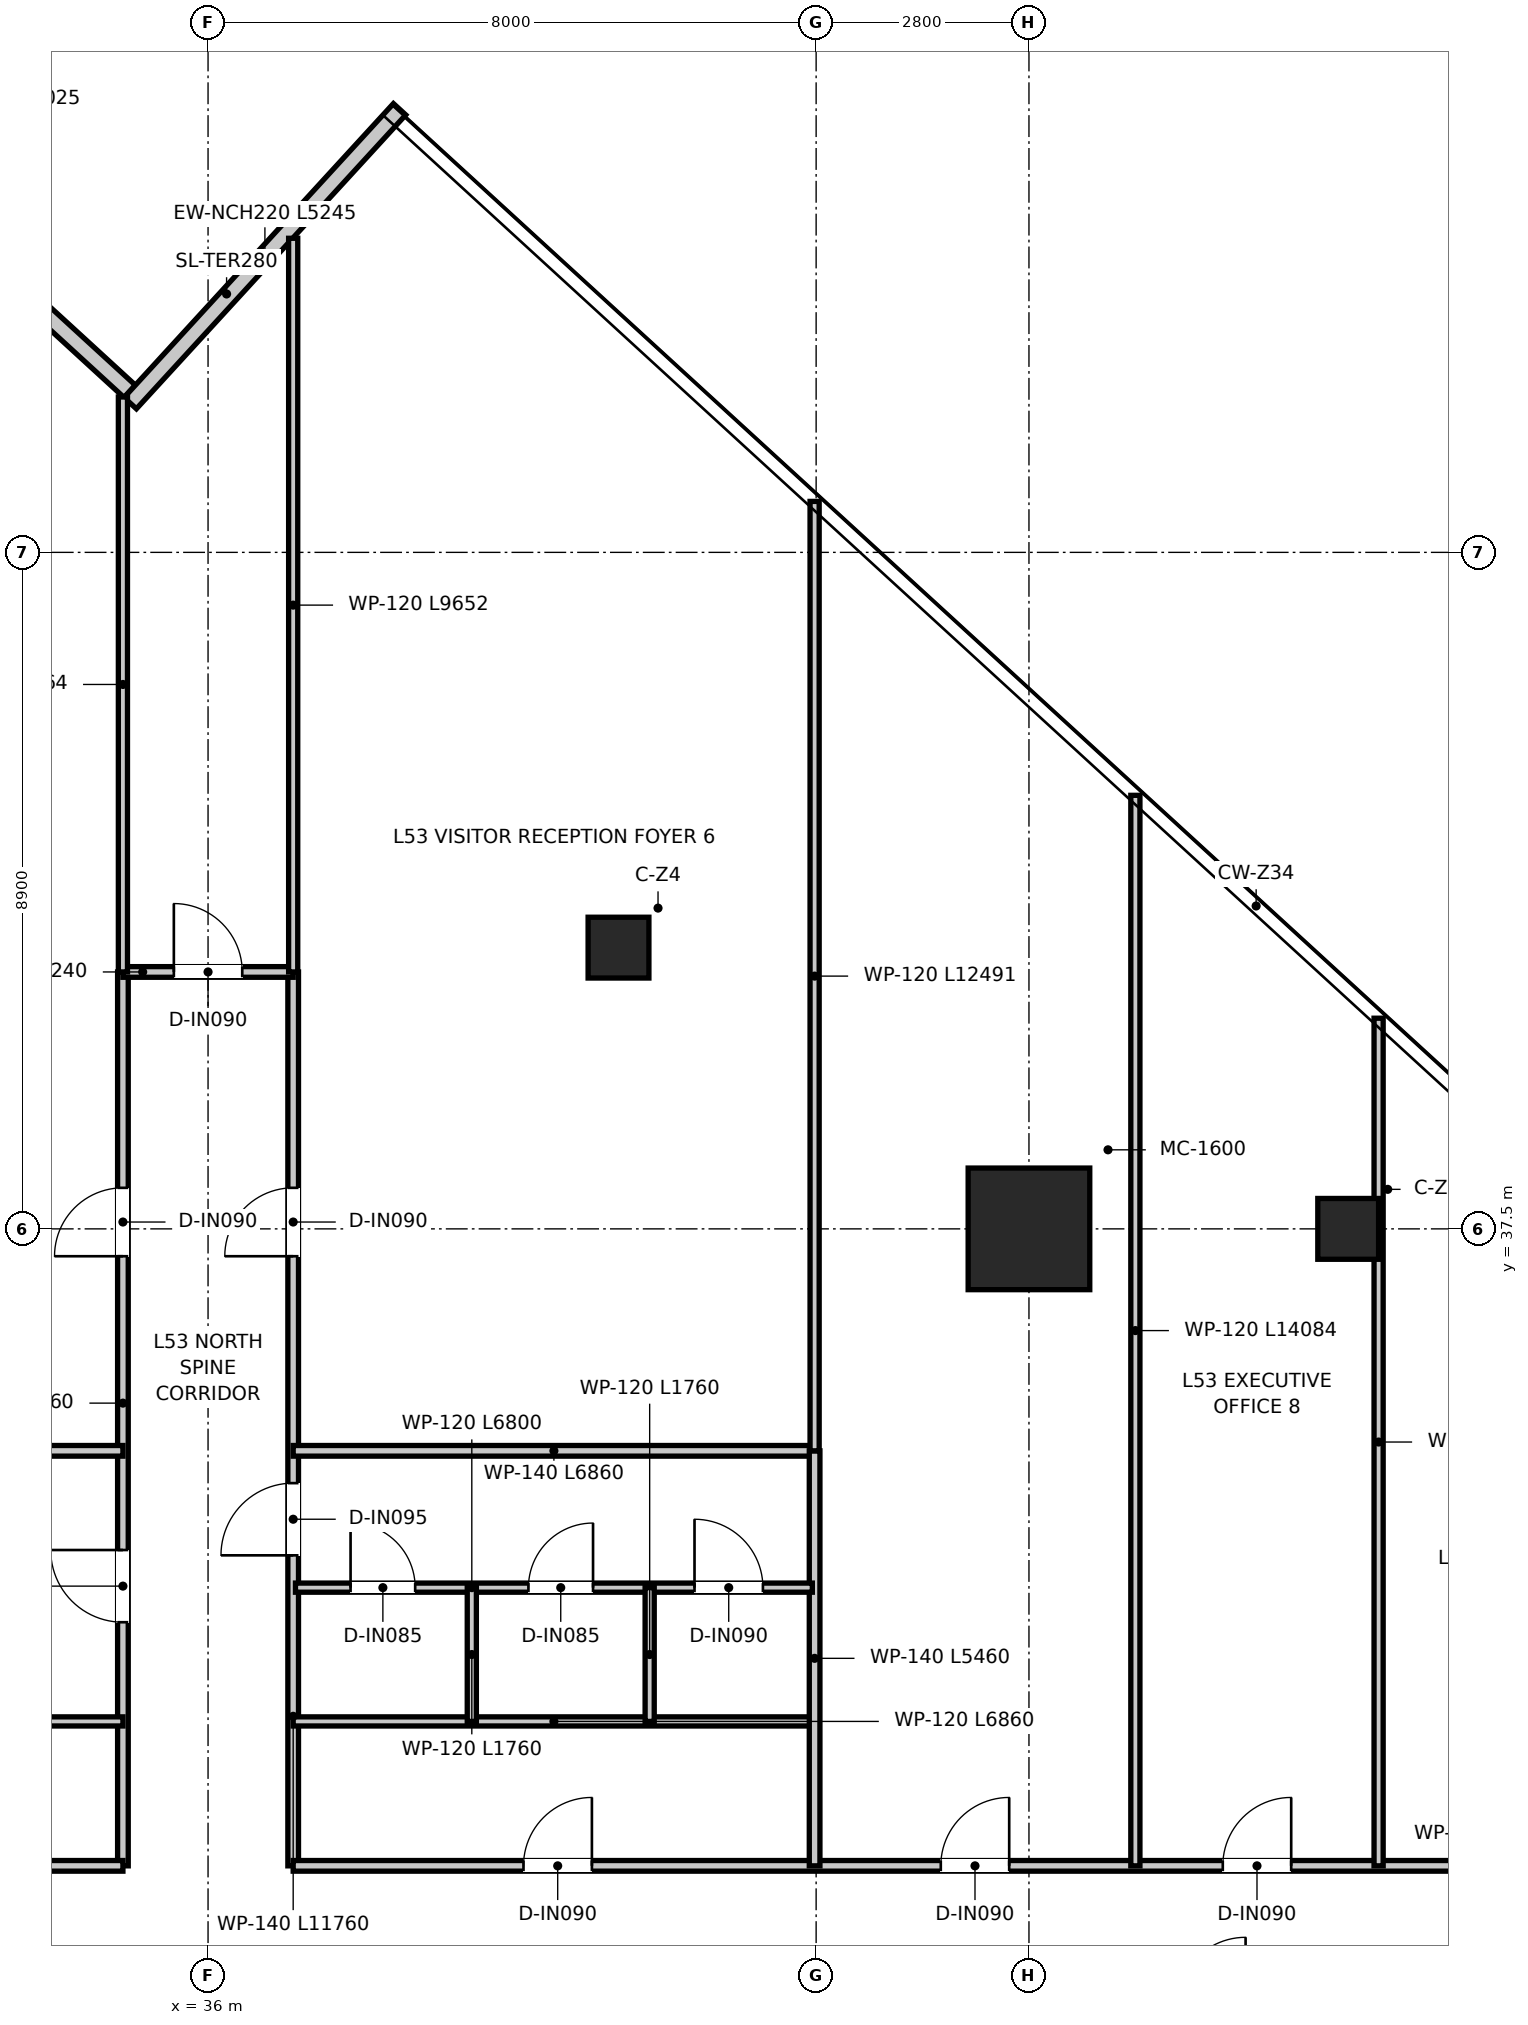
"""IFC4 building model, lengths in metres.
Left out: names, types, materials, properties, quantities, classifications, styles, units other than length and angle.
Written with IfcOpenShell. Run it as: python <this file> out.ifc"""

import sys

from ifc_helpers import new_model, si_unit, direction, frame, frame_2d, origin, origin_2d, place, context, subcontext, project, spatial, rectangle, extrude, source, transform, mapped, element, fill, save


model = new_model("IFC4")
c1 = context("Model", 3, precision=1e-05, world=origin(), true_north=direction((0.0, 1.0)))
c2 = subcontext(c1, "Body", "Model", "MODEL_VIEW")
j1 = project(units=[si_unit("LENGTHUNIT", "METRE"), si_unit("PLANEANGLEUNIT", "RADIAN")], contexts=[c1])
p1 = place(None, origin())
s1 = spatial("IfcSite", under=j1, at=p1, CompositionType="ELEMENT")
p2 = place(p1, origin())
s2 = spatial("IfcBuilding", under=s1, at=p2, CompositionType="ELEMENT")
p3 = place(p2, frame((0.0, 0.0, 219.15)))
s3 = spatial("IfcBuildingStorey", under=s2, at=p3, CompositionType="ELEMENT", Elevation=219.15)
m1 = source(origin(), c2, "Body", "SweptSolid", [
    extrude(rectangle(XDim=1.6, YDim=1.6, at=origin_2d()), origin(), (0.0, 0.0, 1.0), 3.95),
])
p4 = place(p3, frame((46.8, 37.5, 0.0), z_axis=(0.0, 0.0, 1.0), x_axis=(1.0, 0.0, 0.0)))
e1 = element("IfcColumn", 1, at=p4, inside=s3, PredefinedType="USERDEFINED", context=c2, shape_type="MappedRepresentation", body=[
    mapped(m1, transform((0.0, 0.0, 0.0), x_axis=(1.0, 0.0, 0.0), y_axis=(0.0, 1.0, 0.0), z_axis=(0.0, 0.0, 1.0), scale=1.0)),
])
m2 = source(origin(), c2, "Body", "SweptSolid", [
    extrude(rectangle(XDim=0.8, YDim=0.8, at=origin_2d()), origin(), (0.0, 0.0, 1.0), 3.95),
])
for number, where, z_axis, x_axis in (
    (2, (41.4, 41.2, 0.0), (0.0, 0.0, 1.0), (1.0, 0.0, 0.0)),
    (3, (51.0, 37.5, 0.0), (0.0, 0.0, 1.0), (1.0, 0.0, 0.0)),
):
    element("IfcColumn", number, at=place(p3, frame(where, z_axis=z_axis, x_axis=x_axis)), inside=s3, PredefinedType="COLUMN", context=c2, shape_type="MappedRepresentation", body=[
        mapped(m2, transform((0.0, 0.0, 0.0), x_axis=(1.0, 0.0, 0.0), y_axis=(0.0, 1.0, 0.0), z_axis=(0.0, 0.0, 1.0), scale=1.0)),
    ])
p5 = place(p3, frame((34.969, 48.518, 0.0), z_axis=(0.0, 0.0, 1.0), x_axis=(-0.737285215553, 0.675581609375, 0.0)))
e4 = element("IfcWall", 4, at=p5, inside=s3, PredefinedType="ELEMENTEDWALL", context=c2, shape_type="SweptSolid", body=[
    extrude(rectangle(XDim=5.025, YDim=0.22, at=frame_2d((2.512, 0.0))), origin(), (0.0, 0.0, 1.0), 3.67),
])
p6 = place(p3, frame((38.52, 52.23, 0.0), z_axis=(0.0, 0.0, 1.0), x_axis=(-0.675596040677, -0.737271991752, 0.0)))
e5 = element("IfcWall", 5, at=p6, inside=s3, PredefinedType="ELEMENTEDWALL", context=c2, shape_type="SweptSolid", body=[
    extrude(rectangle(XDim=5.245, YDim=0.22, at=frame_2d((2.623, 0.0))), origin(), (0.0, 0.0, 1.0), 3.67),
])
p7 = place(p3, frame((34.88, 29.12, 0.0), z_axis=(0.0, 0.0, 1.0), x_axis=(0.0, 1.0, 0.0)))
e6 = element("IfcWall", 6, at=p7, inside=s3, PredefinedType="PARTITIONING", context=c2, shape_type="SweptSolid", body=[
    extrude(rectangle(XDim=11.76, YDim=0.14, at=frame_2d((5.88, 0.0))), origin(), (0.0, 0.0, 1.0), 3.03),
])
p8 = place(p7, frame((3.205, 0.0, 0.0)))
e7 = element("IfcOpeningElement", 7, at=p8, cuts=e6, PredefinedType="OPENING", context=c2, shape_type="SweptSolid", body=[
    extrude(rectangle(XDim=0.95, YDim=2.1, at=frame_2d((0.475, 1.05))), frame((0.0, 0.08, 0.0), z_axis=(0.0, -1.0, 0.0), x_axis=(1.0, 0.0, 0.0)), (0.0, 0.0, 1.0), 0.16),
])
p9 = place(p7, frame((8.02, 0.0, 0.0)))
e8 = element("IfcOpeningElement", 8, at=p9, cuts=e6, PredefinedType="OPENING", context=c2, shape_type="SweptSolid", body=[
    extrude(rectangle(XDim=0.9, YDim=2.1, at=frame_2d((0.45, 1.05))), frame((0.0, 0.08, 0.0), z_axis=(0.0, -1.0, 0.0), x_axis=(1.0, 0.0, 0.0)), (0.0, 0.0, 1.0), 0.16),
])
p10 = place(p3, frame((37.12, 29.12, 0.0), z_axis=(0.0, 0.0, 1.0), x_axis=(0.0, 1.0, 0.0)))
e9 = element("IfcWall", 9, at=p10, inside=s3, PredefinedType="PARTITIONING", context=c2, shape_type="SweptSolid", body=[
    extrude(rectangle(XDim=11.76, YDim=0.14, at=frame_2d((5.88, 0.0))), origin(), (0.0, 0.0, 1.0), 3.03),
])
p11 = place(p10, frame((4.085, 0.0, 0.0)))
e10 = element("IfcOpeningElement", 10, at=p11, cuts=e9, PredefinedType="OPENING", context=c2, shape_type="SweptSolid", body=[
    extrude(rectangle(XDim=0.95, YDim=2.1, at=frame_2d((0.475, 1.05))), frame((0.0, 0.08, 0.0), z_axis=(0.0, -1.0, 0.0), x_axis=(1.0, 0.0, 0.0)), (0.0, 0.0, 1.0), 0.16),
])
p12 = place(p10, frame((8.02, 0.0, 0.0)))
e11 = element("IfcOpeningElement", 11, at=p12, cuts=e9, PredefinedType="OPENING", context=c2, shape_type="SweptSolid", body=[
    extrude(rectangle(XDim=0.9, YDim=2.1, at=frame_2d((0.45, 1.05))), frame((0.0, 0.08, 0.0), z_axis=(0.0, -1.0, 0.0), x_axis=(1.0, 0.0, 0.0)), (0.0, 0.0, 1.0), 0.16),
])
p13 = place(p3, frame((34.88, 40.88, 0.0), z_axis=(0.0, 0.0, 1.0), x_axis=(1.0, 0.0, 0.0)))
e12 = element("IfcWall", 12, at=p13, inside=s3, PredefinedType="PARTITIONING", context=c2, shape_type="SweptSolid", body=[
    extrude(rectangle(XDim=2.24, YDim=0.14, at=frame_2d((1.12, 0.0))), origin(), (0.0, 0.0, 1.0), 3.67),
])
p14 = place(p13, frame((0.67, 0.0, 0.0)))
e13 = element("IfcOpeningElement", 13, at=p14, cuts=e12, PredefinedType="OPENING", context=c2, shape_type="SweptSolid", body=[
    extrude(rectangle(XDim=0.9, YDim=2.1, at=frame_2d((0.45, 1.05))), frame((0.0, 0.08, 0.0), z_axis=(0.0, -1.0, 0.0), x_axis=(1.0, 0.0, 0.0)), (0.0, 0.0, 1.0), 0.16),
])
p15 = place(p3, frame((10.749, 29.12, 0.0), z_axis=(0.0, 0.0, 1.0), x_axis=(1.0, 0.0, 0.0)))
e14 = element("IfcWall", 14, at=p15, inside=s3, PredefinedType="PARTITIONING", context=c2, shape_type="SweptSolid", body=[
    extrude(rectangle(XDim=24.131, YDim=0.14, at=frame_2d((12.065, 0.0))), origin(), (0.0, 0.0, 1.0), 3.03),
])
p16 = place(p15, frame((20.201, 0.0, 0.0)))
e15 = element("IfcOpeningElement", 15, at=p16, cuts=e14, PredefinedType="OPENING", context=c2, shape_type="SweptSolid", body=[
    extrude(rectangle(XDim=0.9, YDim=2.1, at=frame_2d((0.45, 1.05))), frame((0.0, 0.08, 0.0), z_axis=(0.0, -1.0, 0.0), x_axis=(1.0, 0.0, 0.0)), (0.0, 0.0, 1.0), 0.16),
])
p17 = place(p15, frame((4.664, 0.0, 0.0)))
e16 = element("IfcOpeningElement", 16, at=p17, cuts=e14, PredefinedType="OPENING", context=c2, shape_type="SweptSolid", body=[
    extrude(rectangle(XDim=0.9, YDim=2.1, at=frame_2d((0.45, 1.05))), frame((0.0, 0.08, 0.0), z_axis=(0.0, -1.0, 0.0), x_axis=(1.0, 0.0, 0.0)), (0.0, 0.0, 1.0), 0.16),
])
p18 = place(p15, frame((10.501, 0.0, 0.0)))
e17 = element("IfcOpeningElement", 17, at=p18, cuts=e14, PredefinedType="OPENING", context=c2, shape_type="SweptSolid", body=[
    extrude(rectangle(XDim=0.9, YDim=2.1, at=frame_2d((0.45, 1.05))), frame((0.0, 0.08, 0.0), z_axis=(0.0, -1.0, 0.0), x_axis=(1.0, 0.0, 0.0)), (0.0, 0.0, 1.0), 0.16),
])
p19 = place(p15, frame((14.201, 0.0, 0.0)))
e18 = element("IfcOpeningElement", 18, at=p19, cuts=e14, PredefinedType="OPENING", context=c2, shape_type="SweptSolid", body=[
    extrude(rectangle(XDim=0.9, YDim=2.1, at=frame_2d((0.45, 1.05))), frame((0.0, 0.08, 0.0), z_axis=(0.0, -1.0, 0.0), x_axis=(1.0, 0.0, 0.0)), (0.0, 0.0, 1.0), 0.16),
])
p20 = place(p3, frame((37.12, 29.12, 0.0), z_axis=(0.0, 0.0, 1.0), x_axis=(1.0, 0.0, 0.0)))
e19 = element("IfcWall", 19, at=p20, inside=s3, PredefinedType="PARTITIONING", context=c2, shape_type="SweptSolid", body=[
    extrude(rectangle(XDim=21.815, YDim=0.14, at=frame_2d((10.908, 0.0))), origin(), (0.0, 0.0, 1.0), 3.03),
])
p21 = place(p20, frame((3.03, 0.0, 0.0)))
e20 = element("IfcOpeningElement", 20, at=p21, cuts=e19, PredefinedType="OPENING", context=c2, shape_type="SweptSolid", body=[
    extrude(rectangle(XDim=0.9, YDim=2.1, at=frame_2d((0.45, 1.05))), frame((0.0, 0.08, 0.0), z_axis=(0.0, -1.0, 0.0), x_axis=(1.0, 0.0, 0.0)), (0.0, 0.0, 1.0), 0.16),
])
p22 = place(p20, frame((8.52, 0.0, 0.0)))
e21 = element("IfcOpeningElement", 21, at=p22, cuts=e19, PredefinedType="OPENING", context=c2, shape_type="SweptSolid", body=[
    extrude(rectangle(XDim=0.9, YDim=2.1, at=frame_2d((0.45, 1.05))), frame((0.0, 0.08, 0.0), z_axis=(0.0, -1.0, 0.0), x_axis=(1.0, 0.0, 0.0)), (0.0, 0.0, 1.0), 0.16),
])
p23 = place(p20, frame((12.23, 0.0, 0.0)))
e22 = element("IfcOpeningElement", 22, at=p23, cuts=e19, PredefinedType="OPENING", context=c2, shape_type="SweptSolid", body=[
    extrude(rectangle(XDim=0.9, YDim=2.1, at=frame_2d((0.45, 1.05))), frame((0.0, 0.08, 0.0), z_axis=(0.0, -1.0, 0.0), x_axis=(1.0, 0.0, 0.0)), (0.0, 0.0, 1.0), 0.16),
])
p24 = place(p20, frame((18.367, 0.0, 0.0)))
e23 = element("IfcOpeningElement", 23, at=p24, cuts=e19, PredefinedType="OPENING", context=c2, shape_type="SweptSolid", body=[
    extrude(rectangle(XDim=0.9, YDim=2.1, at=frame_2d((0.45, 1.05))), frame((0.0, 0.08, 0.0), z_axis=(0.0, -1.0, 0.0), x_axis=(1.0, 0.0, 0.0)), (0.0, 0.0, 1.0), 0.16),
])
for number, where, z_axis, x_axis in (
    (24, (28.02, 31.02, 0.0), (0.0, 0.0, 1.0), (1.0, 0.0, 0.0)),
    (25, (37.12, 31.02, 0.0), (0.0, 0.0, 1.0), (1.0, 0.0, 0.0)),
):
    element("IfcWall", number, at=place(p3, frame(where, z_axis=z_axis, x_axis=x_axis)), inside=s3, PredefinedType="PARTITIONING", context=c2, shape_type="SweptSolid", body=[
        extrude(rectangle(XDim=6.86, YDim=0.12, at=frame_2d((3.43, 0.0))), origin(), (0.0, 0.0, 1.0), 3.18),
    ])
for number, where, z_axis, x_axis in (
    (26, (28.02, 34.58, 0.0), (0.0, 0.0, 1.0), (1.0, 0.0, 0.0)),
    (27, (37.12, 34.58, 0.0), (0.0, 0.0, 1.0), (1.0, 0.0, 0.0)),
):
    element("IfcWall", number, at=place(p3, frame(where, z_axis=z_axis, x_axis=x_axis)), inside=s3, PredefinedType="PARTITIONING", context=c2, shape_type="SweptSolid", body=[
        extrude(rectangle(XDim=6.86, YDim=0.14, at=frame_2d((3.43, 0.0))), origin(), (0.0, 0.0, 1.0), 3.18),
    ])
p25 = place(p3, frame((43.98, 29.12, 0.0), z_axis=(0.0, 0.0, 1.0), x_axis=(0.0, 1.0, 0.0)))
e28 = element("IfcWall", 28, at=p25, inside=s3, PredefinedType="PARTITIONING", context=c2, shape_type="SweptSolid", body=[
    extrude(rectangle(XDim=5.46, YDim=0.14, at=frame_2d((2.73, 0.0))), origin(), (0.0, 0.0, 1.0), 3.37),
])
p26 = place(p3, frame((37.15, 32.78, 0.0), z_axis=(0.0, 0.0, 1.0), x_axis=(1.0, 0.0, 0.0)))
e29 = element("IfcWall", 29, at=p26, inside=s3, PredefinedType="PARTITIONING", context=c2, shape_type="SweptSolid", body=[
    extrude(rectangle(XDim=6.8, YDim=0.12, at=frame_2d((3.4, 0.0))), origin(), (0.0, 0.0, 1.0), 3.18),
])
p27 = place(p26, frame((0.725, 0.0, 0.0)))
e30 = element("IfcOpeningElement", 30, at=p27, cuts=e29, PredefinedType="OPENING", context=c2, shape_type="SweptSolid", body=[
    extrude(rectangle(XDim=0.85, YDim=2.1, at=frame_2d((0.425, 1.05))), frame((0.0, 0.07, 0.0), z_axis=(0.0, -1.0, 0.0), x_axis=(1.0, 0.0, 0.0)), (0.0, 0.0, 1.0), 0.14),
])
p28 = place(p26, frame((3.065, 0.0, 0.0)))
e31 = element("IfcOpeningElement", 31, at=p28, cuts=e29, PredefinedType="OPENING", context=c2, shape_type="SweptSolid", body=[
    extrude(rectangle(XDim=0.85, YDim=2.1, at=frame_2d((0.425, 1.05))), frame((0.0, 0.07, 0.0), z_axis=(0.0, -1.0, 0.0), x_axis=(1.0, 0.0, 0.0)), (0.0, 0.0, 1.0), 0.14),
])
p29 = place(p26, frame((5.25, 0.0, 0.0)))
e32 = element("IfcOpeningElement", 32, at=p29, cuts=e29, PredefinedType="OPENING", context=c2, shape_type="SweptSolid", body=[
    extrude(rectangle(XDim=0.9, YDim=2.1, at=frame_2d((0.45, 1.05))), frame((0.0, 0.07, 0.0), z_axis=(0.0, -1.0, 0.0), x_axis=(1.0, 0.0, 0.0)), (0.0, 0.0, 1.0), 0.14),
])
for number, where, z_axis, x_axis in (
    (33, (39.47, 31.02, 0.0), (0.0, 0.0, 1.0), (0.0, 1.0, 0.0)),
    (34, (41.81, 31.02, 0.0), (0.0, 0.0, 1.0), (0.0, 1.0, 0.0)),
):
    element("IfcWall", number, at=place(p3, frame(where, z_axis=z_axis, x_axis=x_axis)), inside=s3, PredefinedType="PARTITIONING", context=c2, shape_type="SweptSolid", body=[
        extrude(rectangle(XDim=1.76, YDim=0.12, at=frame_2d((0.88, 0.0))), origin(), (0.0, 0.0, 1.0), 3.67),
    ])
p30 = place(p3, frame((34.88, 40.88, 0.0), z_axis=(0.0, 0.0, 1.0), x_axis=(0.0, 1.0, 0.0)))
e35 = element("IfcWall", 35, at=p30, inside=s3, PredefinedType="PARTITIONING", context=c2, shape_type="SweptSolid", body=[
    extrude(rectangle(XDim=7.564, YDim=0.12, at=frame_2d((3.782, 0.0))), origin(), (0.0, 0.0, 1.0), 3.28),
])
p31 = place(p3, frame((37.12, 40.88, 0.0), z_axis=(0.0, 0.0, 1.0), x_axis=(0.0, 1.0, 0.0)))
e36 = element("IfcWall", 36, at=p31, inside=s3, PredefinedType="PARTITIONING", context=c2, shape_type="SweptSolid", body=[
    extrude(rectangle(XDim=9.652, YDim=0.12, at=frame_2d((4.826, 0.0))), origin(), (0.0, 0.0, 1.0), 3.28),
])
p32 = place(p3, frame((43.98, 34.58, 0.0), z_axis=(0.0, 0.0, 1.0), x_axis=(0.0, 1.0, 0.0)))
e37 = element("IfcWall", 37, at=p32, inside=s3, PredefinedType="PARTITIONING", context=c2, shape_type="SweptSolid", body=[
    extrude(rectangle(XDim=12.49, YDim=0.12, at=frame_2d((6.245, 0.0))), origin(), (0.0, 0.0, 1.0), 3.03),
])
p33 = place(p3, frame((48.2, 29.12, 0.0), z_axis=(0.0, 0.0, 1.0), x_axis=(0.0, 1.0, 0.0)))
e38 = element("IfcWall", 38, at=p33, inside=s3, PredefinedType="PARTITIONING", context=c2, shape_type="SweptSolid", body=[
    extrude(rectangle(XDim=14.083, YDim=0.12, at=frame_2d((7.042, 0.0))), origin(), (0.0, 0.0, 1.0), 3.18),
])
p34 = place(p3, frame((51.4, 29.12, 0.0), z_axis=(0.0, 0.0, 1.0), x_axis=(0.0, 1.0, 0.0)))
e39 = element("IfcWall", 39, at=p34, inside=s3, PredefinedType="PARTITIONING", context=c2, shape_type="SweptSolid", body=[
    extrude(rectangle(XDim=11.151, YDim=0.12, at=frame_2d((5.576, 0.0))), origin(), (0.0, 0.0, 1.0), 3.67),
])
p35 = place(p21, origin())
e40 = element("IfcDoor", 40, at=p35, inside=s3, OperationType="SINGLE_SWING_RIGHT", PredefinedType="DOOR", context=c2, shape_type="SweptSolid", body=[
    extrude(rectangle(XDim=0.9, YDim=2.1, at=frame_2d((0.45, 1.05))), frame((0.0, 0.025, 0.0), z_axis=(0.0, -1.0, 0.0), x_axis=(1.0, 0.0, 0.0)), (0.0, 0.0, 1.0), 0.05),
])
fill(e20, e40)
p36 = place(p11, origin())
e41 = element("IfcDoor", 41, at=p36, inside=s3, OperationType="SINGLE_SWING_LEFT", PredefinedType="DOOR", context=c2, shape_type="SweptSolid", body=[
    extrude(rectangle(XDim=0.95, YDim=2.1, at=frame_2d((0.475, 1.05))), frame((0.0, 0.025, 0.0), z_axis=(0.0, -1.0, 0.0), x_axis=(1.0, 0.0, 0.0)), (0.0, 0.0, 1.0), 0.05),
])
fill(e10, e41)
p37 = place(p8, origin())
e42 = element("IfcDoor", 42, at=p37, inside=s3, OperationType="SINGLE_SWING_RIGHT", PredefinedType="DOOR", context=c2, shape_type="SweptSolid", body=[
    extrude(rectangle(XDim=0.95, YDim=2.1, at=frame_2d((0.475, 1.05))), frame((0.0, 0.025, 0.0), z_axis=(0.0, -1.0, 0.0), x_axis=(1.0, 0.0, 0.0)), (0.0, 0.0, 1.0), 0.05),
])
fill(e7, e42)
p38 = place(p27, origin())
e43 = element("IfcDoor", 43, at=p38, inside=s3, OperationType="SINGLE_SWING_LEFT", PredefinedType="DOOR", context=c2, shape_type="SweptSolid", body=[
    extrude(rectangle(XDim=0.85, YDim=2.1, at=frame_2d((0.425, 1.05))), frame((0.0, 0.025, 0.0), z_axis=(0.0, -1.0, 0.0), x_axis=(1.0, 0.0, 0.0)), (0.0, 0.0, 1.0), 0.05),
])
fill(e30, e43)
p39 = place(p28, origin())
e44 = element("IfcDoor", 44, at=p39, inside=s3, OperationType="SINGLE_SWING_RIGHT", PredefinedType="DOOR", context=c2, shape_type="SweptSolid", body=[
    extrude(rectangle(XDim=0.85, YDim=2.1, at=frame_2d((0.425, 1.05))), frame((0.0, 0.025, 0.0), z_axis=(0.0, -1.0, 0.0), x_axis=(1.0, 0.0, 0.0)), (0.0, 0.0, 1.0), 0.05),
])
fill(e31, e44)
p40 = place(p29, origin())
e45 = element("IfcDoor", 45, at=p40, inside=s3, OperationType="SINGLE_SWING_LEFT", PredefinedType="DOOR", context=c2, shape_type="SweptSolid", body=[
    extrude(rectangle(XDim=0.9, YDim=2.1, at=frame_2d((0.45, 1.05))), frame((0.0, 0.025, 0.0), z_axis=(0.0, -1.0, 0.0), x_axis=(1.0, 0.0, 0.0)), (0.0, 0.0, 1.0), 0.05),
])
fill(e32, e45)
p41 = place(p14, origin())
e46 = element("IfcDoor", 46, at=p41, inside=s3, OperationType="SINGLE_SWING_LEFT", PredefinedType="DOOR", context=c2, shape_type="SweptSolid", body=[
    extrude(rectangle(XDim=0.9, YDim=2.1, at=frame_2d((0.45, 1.05))), frame((0.0, 0.025, 0.0), z_axis=(0.0, -1.0, 0.0), x_axis=(1.0, 0.0, 0.0)), (0.0, 0.0, 1.0), 0.05),
])
fill(e13, e46)
p42 = place(p9, origin())
e47 = element("IfcDoor", 47, at=p42, inside=s3, OperationType="SINGLE_SWING_LEFT", PredefinedType="DOOR", context=c2, shape_type="SweptSolid", body=[
    extrude(rectangle(XDim=0.9, YDim=2.1, at=frame_2d((0.45, 1.05))), frame((0.0, 0.025, 0.0), z_axis=(0.0, -1.0, 0.0), x_axis=(1.0, 0.0, 0.0)), (0.0, 0.0, 1.0), 0.05),
])
fill(e8, e47)
p43 = place(p12, origin())
e48 = element("IfcDoor", 48, at=p43, inside=s3, OperationType="SINGLE_SWING_LEFT", PredefinedType="DOOR", context=c2, shape_type="SweptSolid", body=[
    extrude(rectangle(XDim=0.9, YDim=2.1, at=frame_2d((0.45, 1.05))), frame((0.0, 0.025, 0.0), z_axis=(0.0, -1.0, 0.0), x_axis=(1.0, 0.0, 0.0)), (0.0, 0.0, 1.0), 0.05),
])
fill(e11, e48)
p44 = place(p22, origin())
e49 = element("IfcDoor", 49, at=p44, inside=s3, OperationType="SINGLE_SWING_RIGHT", PredefinedType="DOOR", context=c2, shape_type="SweptSolid", body=[
    extrude(rectangle(XDim=0.9, YDim=2.1, at=frame_2d((0.45, 1.05))), frame((0.0, 0.025, 0.0), z_axis=(0.0, -1.0, 0.0), x_axis=(1.0, 0.0, 0.0)), (0.0, 0.0, 1.0), 0.05),
])
fill(e21, e49)
p45 = place(p23, origin())
e50 = element("IfcDoor", 50, at=p45, inside=s3, OperationType="SINGLE_SWING_RIGHT", PredefinedType="DOOR", context=c2, shape_type="SweptSolid", body=[
    extrude(rectangle(XDim=0.9, YDim=2.1, at=frame_2d((0.45, 1.05))), frame((0.0, 0.025, 0.0), z_axis=(0.0, -1.0, 0.0), x_axis=(1.0, 0.0, 0.0)), (0.0, 0.0, 1.0), 0.05),
])
fill(e22, e50)
save(model, sys.argv[1])
